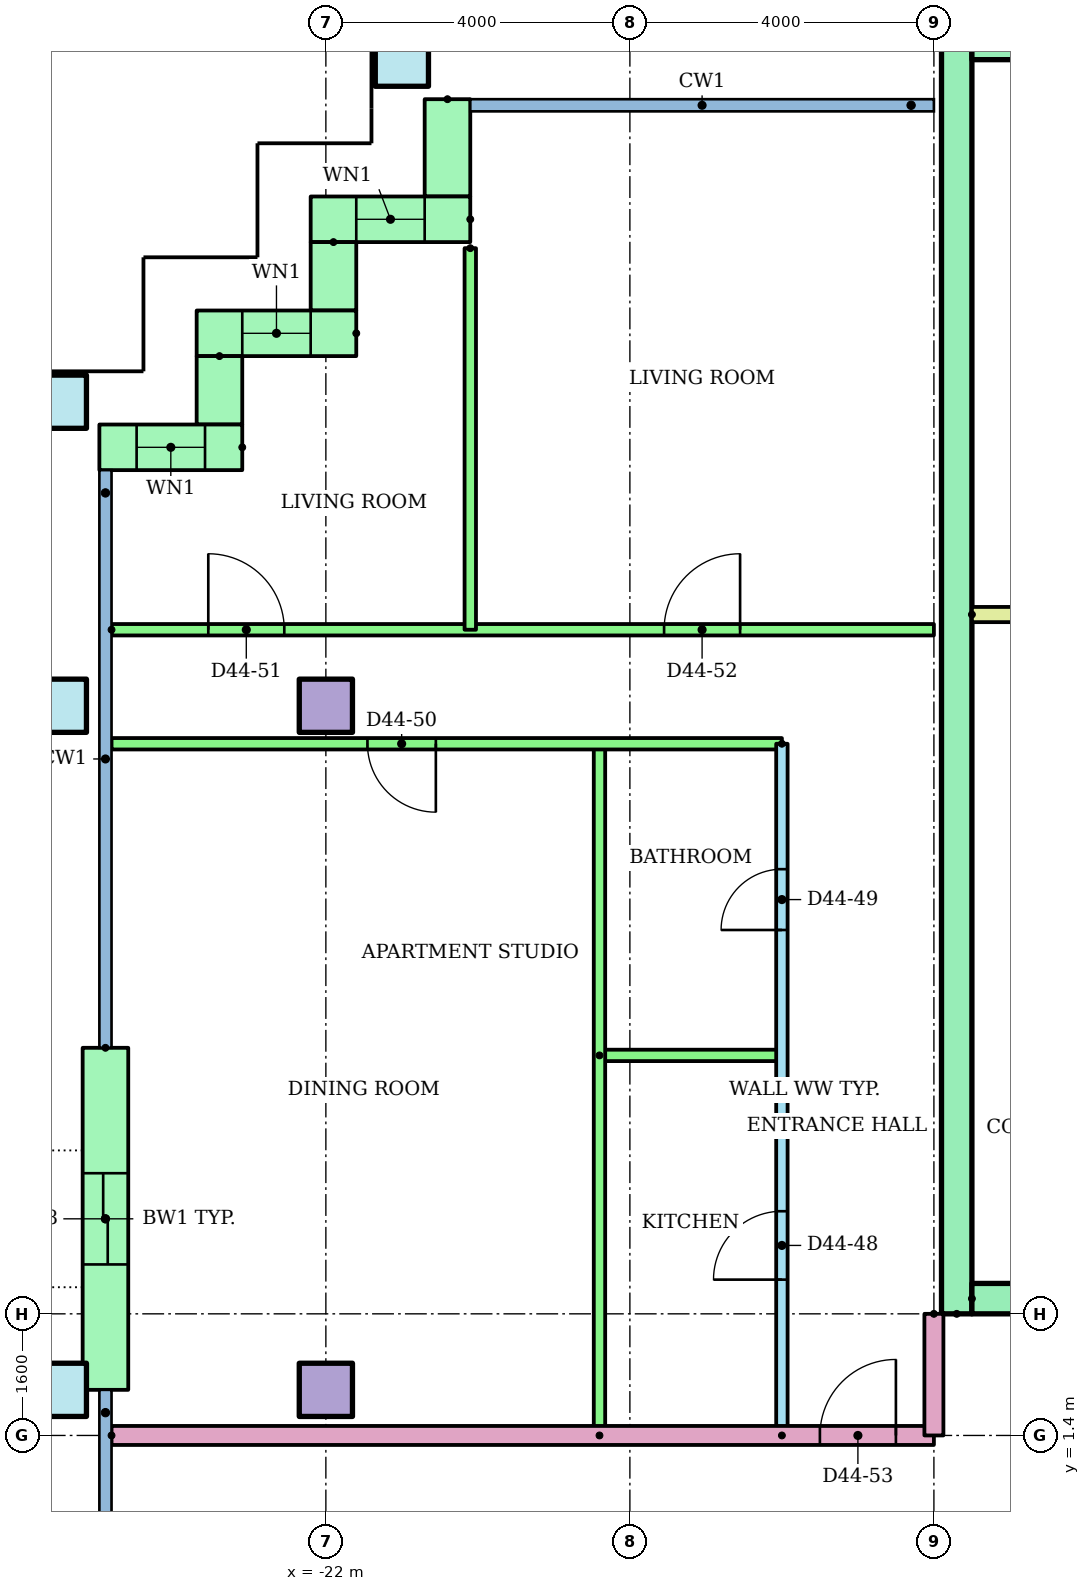
"""IFC4 building model, lengths in metres.
Left out: names, types, materials, properties, quantities, classifications, styles, units other than length and angle.
Written with IfcOpenShell. Run it as: python <this file> out.ifc"""

import sys

from ifc_helpers import new_model, si_unit, direction, frame, frame_2d, origin, origin_2d, place, context, subcontext, project, spatial, rectangle, hollow_rectangle, extrude, element, fill, save


model = new_model("IFC4")
c1 = context("Model", 3, precision=1e-05, world=origin(), true_north=direction((0.0, 1.0)))
c2 = subcontext(c1, "Body", "Model", "MODEL_VIEW")
j1 = project(units=[si_unit("LENGTHUNIT", "METRE"), si_unit("PLANEANGLEUNIT", "RADIAN")], contexts=[c1])
p1 = place(None, origin())
s1 = spatial("IfcSite", under=j1, at=p1, CompositionType="ELEMENT")
p2 = place(p1, origin())
s2 = spatial("IfcBuilding", under=s1, at=p2, CompositionType="ELEMENT")
p3 = place(p2, frame((0.0, 0.0, 171.7)))
s3 = spatial("IfcBuildingStorey", under=s2, at=p3, CompositionType="ELEMENT", Elevation=171.7)
p4 = place(p3, frame((-25.5, 2.0, 0.0)))
e1 = element("IfcColumn", 1, at=p4, inside=s3, PredefinedType="COLUMN", context=c2, shape_type="SweptSolid", body=[
    extrude(hollow_rectangle(XDim=0.7, YDim=0.7, WallThickness=0.036, at=origin_2d()), origin(), (0.0, 0.0, 1.0), 3.2),
])
p5 = place(p3, frame((-22.0, 2.0, 0.0)))
e2 = element("IfcColumn", 2, at=p5, inside=s3, PredefinedType="COLUMN", context=c2, shape_type="SweptSolid", body=[
    extrude(rectangle(XDim=0.7, YDim=0.7, at=origin_2d()), origin(), (0.0, 0.0, 1.0), 3.2),
])
p6 = place(p3, frame((-25.5, 11.0, 0.0)))
e3 = element("IfcColumn", 3, at=p6, inside=s3, PredefinedType="COLUMN", context=c2, shape_type="SweptSolid", body=[
    extrude(hollow_rectangle(XDim=0.7, YDim=0.7, WallThickness=0.036, at=origin_2d()), origin(), (0.0, 0.0, 1.0), 3.2),
])
p7 = place(p3, frame((-22.0, 11.0, 0.0)))
e4 = element("IfcColumn", 4, at=p7, inside=s3, PredefinedType="COLUMN", context=c2, shape_type="SweptSolid", body=[
    extrude(rectangle(XDim=0.7, YDim=0.7, at=origin_2d()), origin(), (0.0, 0.0, 1.0), 3.2),
])
for number, where in (
    (5, (-25.5, 15.0, 0.0)),
    (6, (-21.0, 19.5, 0.0)),
):
    element("IfcColumn", number, at=place(p3, frame(where)), inside=s3, PredefinedType="COLUMN", context=c2, shape_type="SweptSolid", body=[
        extrude(hollow_rectangle(XDim=0.7, YDim=0.7, WallThickness=0.036, at=origin_2d()), origin(), (0.0, 0.0, 1.0), 3.2),
    ])
p8 = place(p3, frame((-20.4, 18.98, 0.0), z_axis=(0.0, 0.0, 1.0), x_axis=(0.0, -1.0, 0.0)))
e7 = element("IfcWall", 7, at=p8, inside=s3, PredefinedType="STANDARD", context=c2, shape_type="SweptSolid", body=[
    extrude(rectangle(XDim=1.28, YDim=0.6, at=frame_2d((0.64, 0.0))), origin(), (0.0, 0.0, 1.0), 2.92),
])
p9 = place(p3, frame((-20.1, 17.4, 0.0), z_axis=(0.0, 0.0, 1.0), x_axis=(-1.0, 0.0, 0.0)))
e8 = element("IfcWall", 8, at=p9, inside=s3, PredefinedType="STANDARD", context=c2, shape_type="SweptSolid", body=[
    extrude(rectangle(XDim=2.1, YDim=0.6, at=frame_2d((1.05, 0.0))), origin(), (0.0, 0.0, 1.0), 2.92),
])
p10 = place(p9, frame((0.6, 0.0, 0.9)))
e9 = element("IfcOpeningElement", 9, at=p10, cuts=e8, PredefinedType="OPENING", context=c2, shape_type="SweptSolid", body=[
    extrude(rectangle(XDim=0.9, YDim=1.5, at=frame_2d((0.45, 0.75))), frame((0.0, 0.31, 0.0), z_axis=(0.0, -1.0, 0.0), x_axis=(1.0, 0.0, 0.0)), (0.0, 0.0, 1.0), 0.62),
])
p11 = place(p3, frame((-21.9, 17.1, 0.0), z_axis=(0.0, 0.0, 1.0), x_axis=(0.0, -1.0, 0.0)))
e10 = element("IfcWall", 10, at=p11, inside=s3, PredefinedType="STANDARD", context=c2, shape_type="SweptSolid", body=[
    extrude(rectangle(XDim=0.9, YDim=0.6, at=frame_2d((0.45, 0.0))), origin(), (0.0, 0.0, 1.0), 2.92),
])
p12 = place(p3, frame((-21.6, 15.9, 0.0), z_axis=(0.0, 0.0, 1.0), x_axis=(-1.0, 0.0, 0.0)))
e11 = element("IfcWall", 11, at=p12, inside=s3, PredefinedType="STANDARD", context=c2, shape_type="SweptSolid", body=[
    extrude(rectangle(XDim=2.1, YDim=0.6, at=frame_2d((1.05, 0.0))), origin(), (0.0, 0.0, 1.0), 2.92),
])
p13 = place(p12, frame((0.6, 0.0, 0.9)))
e12 = element("IfcOpeningElement", 12, at=p13, cuts=e11, PredefinedType="OPENING", context=c2, shape_type="SweptSolid", body=[
    extrude(rectangle(XDim=0.9, YDim=1.5, at=frame_2d((0.45, 0.75))), frame((0.0, 0.31, 0.0), z_axis=(0.0, -1.0, 0.0), x_axis=(1.0, 0.0, 0.0)), (0.0, 0.0, 1.0), 0.62),
])
p14 = place(p3, frame((-23.4, 15.6, 0.0), z_axis=(0.0, 0.0, 1.0), x_axis=(0.0, -1.0, 0.0)))
e13 = element("IfcWall", 13, at=p14, inside=s3, PredefinedType="STANDARD", context=c2, shape_type="SweptSolid", body=[
    extrude(rectangle(XDim=0.9, YDim=0.6, at=frame_2d((0.45, 0.0))), origin(), (0.0, 0.0, 1.0), 2.92),
])
p15 = place(p3, frame((-23.1, 14.4, 0.0), z_axis=(0.0, 0.0, 1.0), x_axis=(-1.0, 0.0, 0.0)))
e14 = element("IfcWall", 14, at=p15, inside=s3, PredefinedType="STANDARD", context=c2, shape_type="SweptSolid", body=[
    extrude(rectangle(XDim=1.88, YDim=0.6, at=frame_2d((0.94, 0.0))), origin(), (0.0, 0.0, 1.0), 2.92),
])
p16 = place(p15, frame((0.49, 0.0, 0.9)))
e15 = element("IfcOpeningElement", 15, at=p16, cuts=e14, PredefinedType="OPENING", context=c2, shape_type="SweptSolid", body=[
    extrude(rectangle(XDim=0.9, YDim=1.5, at=frame_2d((0.45, 0.75))), frame((0.0, 0.31, 0.0), z_axis=(0.0, -1.0, 0.0), x_axis=(1.0, 0.0, 0.0)), (0.0, 0.0, 1.0), 0.62),
])
p17 = place(p3, frame((-24.9, 6.5, 0.0), z_axis=(0.0, 0.0, 1.0), x_axis=(0.0, -1.0, 0.0)))
e16 = element("IfcWall", 16, at=p17, inside=s3, PredefinedType="STANDARD", context=c2, shape_type="SweptSolid", body=[
    extrude(rectangle(XDim=4.5, YDim=0.6, at=frame_2d((2.25, 0.0))), origin(), (0.0, 0.0, 1.0), 2.92),
])
p18 = place(p17, frame((1.65, 0.0, 0.0)))
e17 = element("IfcOpeningElement", 17, at=p18, cuts=e16, PredefinedType="OPENING", context=c2, shape_type="SweptSolid", body=[
    extrude(rectangle(XDim=1.2, YDim=2.1, at=frame_2d((0.6, 1.05))), frame((0.0, 0.31, 0.0), z_axis=(0.0, -1.0, 0.0), x_axis=(1.0, 0.0, 0.0)), (0.0, 0.0, 1.0), 0.62),
])
p19 = place(p3, frame((-13.7, 3.0, 0.0), z_axis=(0.0, 0.0, 1.0), x_axis=(0.0, 1.0, 0.0)))
e18 = element("IfcWall", 18, at=p19, inside=s3, PredefinedType="SHEAR", context=c2, shape_type="SweptSolid", body=[
    extrude(rectangle(XDim=17.0, YDim=0.4, at=frame_2d((8.5, 0.0))), origin(), (0.0, 0.0, 1.0), 2.92),
])
p20 = place(p3, frame((-13.5, 19.7, 0.0)))
e19 = element("IfcWall", 19, at=p20, inside=s3, PredefinedType="SHEAR", context=c2, shape_type="SweptSolid", body=[
    extrude(rectangle(XDim=27.0, YDim=0.4, at=frame_2d((13.5, 0.0))), origin(), (0.0, 0.0, 1.0), 2.92),
])
p21 = place(p3, frame((-13.5, 3.2, 0.0)))
e20 = element("IfcWall", 20, at=p21, inside=s3, PredefinedType="SHEAR", context=c2, shape_type="SweptSolid", body=[
    extrude(rectangle(XDim=27.0, YDim=0.4, at=frame_2d((13.5, 0.0))), origin(), (0.0, 0.0, 1.0), 2.92),
])
p22 = place(p21, frame((22.083, 0.0, 0.0)))
e21 = element("IfcOpeningElement", 21, at=p22, cuts=e20, PredefinedType="OPENING", context=c2, shape_type="SweptSolid", body=[
    extrude(rectangle(XDim=1.1, YDim=2.1, at=frame_2d((0.55, 1.05))), frame((0.0, 0.21, 0.0), z_axis=(0.0, -1.0, 0.0), x_axis=(1.0, 0.0, 0.0)), (0.0, 0.0, 1.0), 0.42),
])
p23 = place(p21, frame((25.128, 0.0, 0.0)))
e22 = element("IfcOpeningElement", 22, at=p23, cuts=e20, PredefinedType="OPENING", context=c2, shape_type="SweptSolid", body=[
    extrude(rectangle(XDim=1.1, YDim=2.1, at=frame_2d((0.55, 1.05))), frame((0.0, 0.21, 0.0), z_axis=(0.0, -1.0, 0.0), x_axis=(1.0, 0.0, 0.0)), (0.0, 0.0, 1.0), 0.42),
])
p24 = place(p21, frame((12.6, 0.0, 0.0)))
e23 = element("IfcOpeningElement", 23, at=p24, cuts=e20, PredefinedType="OPENING", context=c2, shape_type="SweptSolid", body=[
    extrude(rectangle(XDim=1.8, YDim=2.1, at=frame_2d((0.9, 1.05))), frame((0.0, 0.21, 0.0), z_axis=(0.0, -1.0, 0.0), x_axis=(1.0, 0.0, 0.0)), (0.0, 0.0, 1.0), 0.42),
])
p25 = place(p3, frame((-13.5, 12.2, 0.0)))
e24 = element("IfcWall", 24, at=p25, inside=s3, PredefinedType="PARTITIONING", context=c2, shape_type="SweptSolid", body=[
    extrude(rectangle(XDim=3.9, YDim=0.2, at=frame_2d((1.95, 0.0))), origin(), (0.0, 0.0, 1.0), 2.92),
])
p26 = place(p3, frame((-16.0, 1.4, 0.0), z_axis=(0.0, 0.0, 1.0), x_axis=(0.0, 1.0, 0.0)))
e25 = element("IfcWall", 25, at=p26, inside=s3, PredefinedType="PARTITIONING", context=c2, shape_type="SweptSolid", body=[
    extrude(rectangle(XDim=9.1, YDim=0.15, at=frame_2d((4.55, 0.0))), origin(), (0.0, 0.0, 1.0), 2.4),
])
p27 = place(p26, frame((2.05, 0.0, 0.0)))
e26 = element("IfcOpeningElement", 26, at=p27, cuts=e25, PredefinedType="OPENING", context=c2, shape_type="SweptSolid", body=[
    extrude(rectangle(XDim=0.9, YDim=2.1, at=frame_2d((0.45, 1.05))), frame((0.0, 0.085, 0.0), z_axis=(0.0, -1.0, 0.0), x_axis=(1.0, 0.0, 0.0)), (0.0, 0.0, 1.0), 0.17),
])
p28 = place(p26, frame((6.65, 0.0, 0.0)))
e27 = element("IfcOpeningElement", 27, at=p28, cuts=e25, PredefinedType="OPENING", context=c2, shape_type="SweptSolid", body=[
    extrude(rectangle(XDim=0.8, YDim=2.1, at=frame_2d((0.4, 1.05))), frame((0.0, 0.085, 0.0), z_axis=(0.0, -1.0, 0.0), x_axis=(1.0, 0.0, 0.0)), (0.0, 0.0, 1.0), 0.17),
])
p29 = place(p3, frame((-18.4, 6.4, 0.0)))
e28 = element("IfcWall", 28, at=p29, inside=s3, PredefinedType="PARTITIONING", context=c2, shape_type="SweptSolid", body=[
    extrude(rectangle(XDim=2.4, YDim=0.15, at=frame_2d((1.2, 0.0))), origin(), (0.0, 0.0, 1.0), 2.4),
])
p30 = place(p3, frame((-18.4, 1.4, 0.0), z_axis=(0.0, 0.0, 1.0), x_axis=(0.0, 1.0, 0.0)))
e29 = element("IfcWall", 29, at=p30, inside=s3, PredefinedType="PARTITIONING", context=c2, shape_type="SweptSolid", body=[
    extrude(rectangle(XDim=9.1, YDim=0.15, at=frame_2d((4.55, 0.0))), origin(), (0.0, 0.0, 1.0), 2.4),
])
p31 = place(p3, frame((-16.0, 10.5, 0.0), z_axis=(0.0, 0.0, 1.0), x_axis=(-1.0, 0.0, 0.0)))
e30 = element("IfcWall", 30, at=p31, inside=s3, PredefinedType="PARTITIONING", context=c2, shape_type="SweptSolid", body=[
    extrude(rectangle(XDim=8.82, YDim=0.15, at=frame_2d((4.41, 0.0))), origin(), (0.0, 0.0, 1.0), 2.4),
])
p32 = place(p31, frame((4.553, 0.0, 0.0)))
e31 = element("IfcOpeningElement", 31, at=p32, cuts=e30, PredefinedType="OPENING", context=c2, shape_type="SweptSolid", body=[
    extrude(rectangle(XDim=0.9, YDim=2.1, at=frame_2d((0.45, 1.05))), frame((0.0, 0.085, 0.0), z_axis=(0.0, -1.0, 0.0), x_axis=(1.0, 0.0, 0.0)), (0.0, 0.0, 1.0), 0.17),
])
p33 = place(p3, frame((-24.82, 12.0, 0.0)))
e32 = element("IfcWall", 32, at=p33, inside=s3, PredefinedType="PARTITIONING", context=c2, shape_type="SweptSolid", body=[
    extrude(rectangle(XDim=10.82, YDim=0.15, at=frame_2d((5.41, 0.0))), origin(), (0.0, 0.0, 1.0), 2.4),
])
p34 = place(p33, frame((1.273, 0.0, 0.0)))
e33 = element("IfcOpeningElement", 33, at=p34, cuts=e32, PredefinedType="OPENING", context=c2, shape_type="SweptSolid", body=[
    extrude(rectangle(XDim=1.0, YDim=2.1, at=frame_2d((0.5, 1.05))), frame((0.0, 0.085, 0.0), z_axis=(0.0, -1.0, 0.0), x_axis=(1.0, 0.0, 0.0)), (0.0, 0.0, 1.0), 0.17),
])
p35 = place(p33, frame((7.27, 0.0, 0.0)))
e34 = element("IfcOpeningElement", 34, at=p35, cuts=e32, PredefinedType="OPENING", context=c2, shape_type="SweptSolid", body=[
    extrude(rectangle(XDim=1.0, YDim=2.1, at=frame_2d((0.5, 1.05))), frame((0.0, 0.085, 0.0), z_axis=(0.0, -1.0, 0.0), x_axis=(1.0, 0.0, 0.0)), (0.0, 0.0, 1.0), 0.17),
])
p36 = place(p3, frame((-20.1, 17.02, 0.0), z_axis=(0.0, 0.0, 1.0), x_axis=(0.0, -1.0, 0.0)))
e35 = element("IfcWall", 35, at=p36, inside=s3, PredefinedType="PARTITIONING", context=c2, shape_type="SweptSolid", body=[
    extrude(rectangle(XDim=5.02, YDim=0.15, at=frame_2d((2.51, 0.0))), origin(), (0.0, 0.0, 1.0), 2.4),
])
p37 = place(p3, frame((-24.82, 1.4, 0.0)))
e36 = element("IfcWall", 36, at=p37, inside=s3, PredefinedType="PARTITIONING", context=c2, shape_type="SweptSolid", body=[
    extrude(rectangle(XDim=10.82, YDim=0.25, at=frame_2d((5.41, 0.0))), origin(), (0.0, 0.0, 1.0), 2.4),
])
p38 = place(p37, frame((9.32, 0.0, 0.0)))
e37 = element("IfcOpeningElement", 37, at=p38, cuts=e36, PredefinedType="OPENING", context=c2, shape_type="SweptSolid", body=[
    extrude(rectangle(XDim=1.0, YDim=2.1, at=frame_2d((0.5, 1.05))), frame((0.0, 0.135, 0.0), z_axis=(0.0, -1.0, 0.0), x_axis=(1.0, 0.0, 0.0)), (0.0, 0.0, 1.0), 0.27),
])
p39 = place(p3, frame((-14.0, 3.0, 0.0), z_axis=(0.0, 0.0, 1.0), x_axis=(0.0, -1.0, 0.0)))
e38 = element("IfcWall", 38, at=p39, inside=s3, PredefinedType="PARTITIONING", context=c2, shape_type="SweptSolid", body=[
    extrude(rectangle(XDim=1.6, YDim=0.25, at=frame_2d((0.8, 0.0))), origin(), (0.0, 0.0, 1.0), 2.4),
])
p40 = place(p10, origin())
e39 = element("IfcWindow", 39, at=p40, inside=s3, PartitioningType="SINGLE_PANEL", PredefinedType="WINDOW", context=c2, shape_type="SweptSolid", body=[
    extrude(rectangle(XDim=0.9, YDim=1.5, at=frame_2d((0.45, 0.75))), frame((0.0, 0.03, 0.0), z_axis=(0.0, -1.0, 0.0), x_axis=(1.0, 0.0, 0.0)), (0.0, 0.0, 1.0), 0.06),
])
fill(e9, e39)
p41 = place(p13, origin())
e40 = element("IfcWindow", 40, at=p41, inside=s3, PartitioningType="SINGLE_PANEL", PredefinedType="WINDOW", context=c2, shape_type="SweptSolid", body=[
    extrude(rectangle(XDim=0.9, YDim=1.5, at=frame_2d((0.45, 0.75))), frame((0.0, 0.03, 0.0), z_axis=(0.0, -1.0, 0.0), x_axis=(1.0, 0.0, 0.0)), (0.0, 0.0, 1.0), 0.06),
])
fill(e12, e40)
p42 = place(p16, origin())
e41 = element("IfcWindow", 41, at=p42, inside=s3, PartitioningType="SINGLE_PANEL", PredefinedType="WINDOW", context=c2, shape_type="SweptSolid", body=[
    extrude(rectangle(XDim=0.9, YDim=1.5, at=frame_2d((0.45, 0.75))), frame((0.0, 0.03, 0.0), z_axis=(0.0, -1.0, 0.0), x_axis=(1.0, 0.0, 0.0)), (0.0, 0.0, 1.0), 0.06),
])
fill(e15, e41)
p43 = place(p27, origin())
e42 = element("IfcDoor", 42, at=p43, inside=s3, OperationType="SINGLE_SWING_LEFT", PredefinedType="DOOR", context=c2, shape_type="SweptSolid", body=[
    extrude(rectangle(XDim=0.9, YDim=2.1, at=frame_2d((0.45, 1.05))), frame((0.0, 0.025, 0.0), z_axis=(0.0, -1.0, 0.0), x_axis=(1.0, 0.0, 0.0)), (0.0, 0.0, 1.0), 0.05),
])
fill(e26, e42)
p44 = place(p28, origin())
e43 = element("IfcDoor", 43, at=p44, inside=s3, OperationType="SINGLE_SWING_LEFT", PredefinedType="DOOR", context=c2, shape_type="SweptSolid", body=[
    extrude(rectangle(XDim=0.8, YDim=2.1, at=frame_2d((0.4, 1.05))), frame((0.0, 0.025, 0.0), z_axis=(0.0, -1.0, 0.0), x_axis=(1.0, 0.0, 0.0)), (0.0, 0.0, 1.0), 0.05),
])
fill(e27, e43)
p45 = place(p32, origin())
e44 = element("IfcDoor", 44, at=p45, inside=s3, OperationType="SINGLE_SWING_LEFT", PredefinedType="DOOR", context=c2, shape_type="SweptSolid", body=[
    extrude(rectangle(XDim=0.9, YDim=2.1, at=frame_2d((0.45, 1.05))), frame((0.0, 0.025, 0.0), z_axis=(0.0, -1.0, 0.0), x_axis=(1.0, 0.0, 0.0)), (0.0, 0.0, 1.0), 0.05),
])
fill(e31, e44)
p46 = place(p34, origin())
e45 = element("IfcDoor", 45, at=p46, inside=s3, OperationType="SINGLE_SWING_LEFT", PredefinedType="DOOR", context=c2, shape_type="SweptSolid", body=[
    extrude(rectangle(XDim=1.0, YDim=2.1, at=frame_2d((0.5, 1.05))), frame((0.0, 0.025, 0.0), z_axis=(0.0, -1.0, 0.0), x_axis=(1.0, 0.0, 0.0)), (0.0, 0.0, 1.0), 0.05),
])
fill(e33, e45)
p47 = place(p35, origin())
e46 = element("IfcDoor", 46, at=p47, inside=s3, OperationType="SINGLE_SWING_RIGHT", PredefinedType="DOOR", context=c2, shape_type="SweptSolid", body=[
    extrude(rectangle(XDim=1.0, YDim=2.1, at=frame_2d((0.5, 1.05))), frame((0.0, 0.025, 0.0), z_axis=(0.0, -1.0, 0.0), x_axis=(1.0, 0.0, 0.0)), (0.0, 0.0, 1.0), 0.05),
])
fill(e34, e46)
p48 = place(p38, origin())
e47 = element("IfcDoor", 47, at=p48, inside=s3, OperationType="SINGLE_SWING_RIGHT", PredefinedType="DOOR", context=c2, shape_type="SweptSolid", body=[
    extrude(rectangle(XDim=1.0, YDim=2.1, at=frame_2d((0.5, 1.05))), frame((0.0, 0.025, 0.0), z_axis=(0.0, -1.0, 0.0), x_axis=(1.0, 0.0, 0.0)), (0.0, 0.0, 1.0), 0.05),
])
fill(e37, e47)
p49 = place(p18, origin())
e48 = element("IfcDoor", 48, at=p49, inside=s3, OperationType="SLIDING_TO_LEFT", PredefinedType="DOOR", context=c2, shape_type="SweptSolid", body=[
    extrude(rectangle(XDim=1.2, YDim=2.1, at=frame_2d((0.6, 1.05))), frame((0.0, 0.025, 0.0), z_axis=(0.0, -1.0, 0.0), x_axis=(1.0, 0.0, 0.0)), (0.0, 0.0, 1.0), 0.05),
])
fill(e17, e48)
save(model, sys.argv[1])
